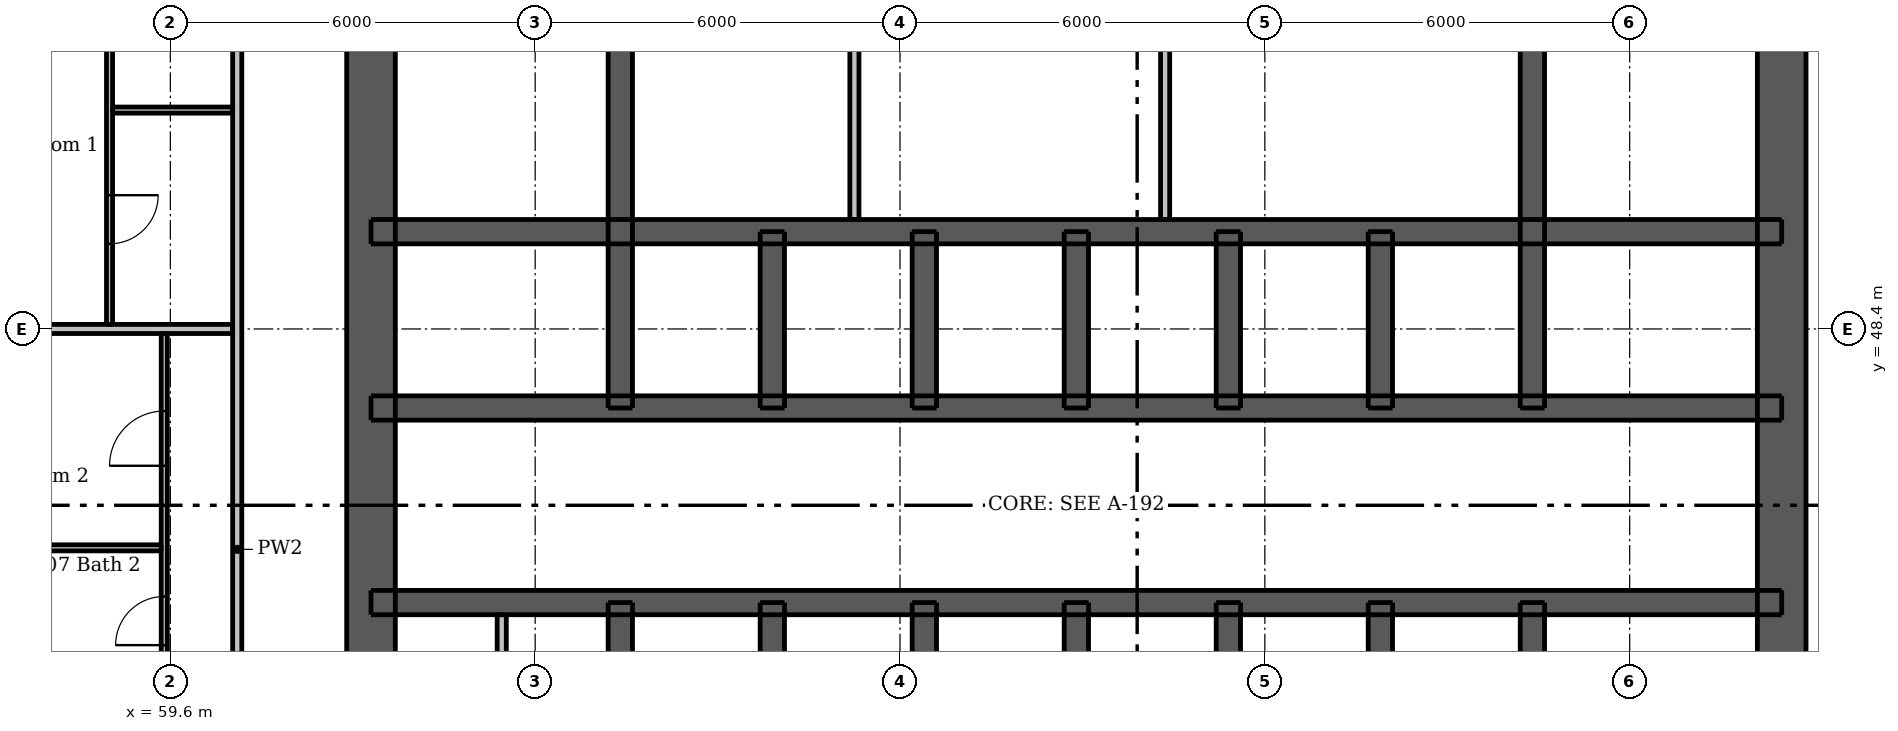
"""IFC4 building model, lengths in metres.
Left out: names, types, materials, properties, quantities, classifications, styles, units other than length and angle.
Written with IfcOpenShell. Run it as: python <this file> out.ifc"""

import sys

from ifc_helpers import new_model, si_unit, direction, frame, frame_2d, origin, place, context, subcontext, project, spatial, rectangle, extrude, element, fill, save


model = new_model("IFC4")
c1 = context("Model", 3, precision=1e-05, world=origin(), true_north=direction((0.0, 1.0)))
c2 = subcontext(c1, "Body", "Model", "MODEL_VIEW")
j1 = project(units=[si_unit("LENGTHUNIT", "METRE"), si_unit("PLANEANGLEUNIT", "RADIAN")], contexts=[c1])
p1 = place(None, origin())
s1 = spatial("IfcSite", under=j1, at=p1, CompositionType="ELEMENT")
p2 = place(p1, origin())
s2 = spatial("IfcBuilding", under=s1, at=p2, CompositionType="ELEMENT")
p3 = place(p2, frame((0.0, 0.0, 85.3)))
s3 = spatial("IfcBuildingStorey", under=s2, at=p3, CompositionType="ELEMENT", Elevation=85.3)
p4 = place(p3, frame((62.9, 33.5, 0.0), z_axis=(0.0, 0.0, 1.0), x_axis=(0.0, 1.0, 0.0)))
e1 = element("IfcWall", 1, at=p4, inside=s3, PredefinedType="SHEAR", context=c2, shape_type="SweptSolid", body=[
    extrude(rectangle(XDim=24.0, YDim=0.8, at=frame_2d((12.0, 0.0))), origin(), (0.0, 0.0, 1.0), 3.05),
])
p5 = place(p4, frame((11.2, 0.0, 0.0)))
e2 = element("IfcOpeningElement", 2, at=p5, cuts=e1, PredefinedType="OPENING", context=c2, shape_type="SweptSolid", body=[
    extrude(rectangle(XDim=1.6, YDim=2.1, at=frame_2d((0.8, 1.05))), frame((0.0, 0.41, 0.0), z_axis=(0.0, -1.0, 0.0), x_axis=(1.0, 0.0, 0.0)), (0.0, 0.0, 1.0), 0.82),
])
p6 = place(p3, frame((86.1, 33.5, 0.0), z_axis=(0.0, 0.0, 1.0), x_axis=(0.0, 1.0, 0.0)))
e3 = element("IfcWall", 3, at=p6, inside=s3, PredefinedType="SHEAR", context=c2, shape_type="SweptSolid", body=[
    extrude(rectangle(XDim=24.0, YDim=0.8, at=frame_2d((12.0, 0.0))), origin(), (0.0, 0.0, 1.0), 3.05),
])
p7 = place(p6, frame((11.2, 0.0, 0.0)))
e4 = element("IfcOpeningElement", 4, at=p7, cuts=e3, PredefinedType="OPENING", context=c2, shape_type="SweptSolid", body=[
    extrude(rectangle(XDim=1.6, YDim=2.1, at=frame_2d((0.8, 1.05))), frame((0.0, 0.41, 0.0), z_axis=(0.0, -1.0, 0.0), x_axis=(1.0, 0.0, 0.0)), (0.0, 0.0, 1.0), 0.82),
])
p8 = place(p3, frame((62.9, 43.9, 0.0), z_axis=(0.0, 0.0, 1.0), x_axis=(1.0, 0.0, 0.0)))
e5 = element("IfcWall", 5, at=p8, inside=s3, PredefinedType="SHEAR", context=c2, shape_type="SweptSolid", body=[
    extrude(rectangle(XDim=23.2, YDim=0.4, at=frame_2d((11.6, 0.0))), origin(), (0.0, 0.0, 1.0), 3.05),
])
p9 = place(p8, frame((0.825, 0.0, 0.0)))
e6 = element("IfcOpeningElement", 6, at=p9, cuts=e5, PredefinedType="OPENING", context=c2, shape_type="SweptSolid", body=[
    extrude(rectangle(XDim=0.9, YDim=2.1, at=frame_2d((0.45, 1.05))), frame((0.0, 0.21, 0.0), z_axis=(0.0, -1.0, 0.0), x_axis=(1.0, 0.0, 0.0)), (0.0, 0.0, 1.0), 0.42),
])
p10 = place(p8, frame((2.575, 0.0, 0.0)))
e7 = element("IfcOpeningElement", 7, at=p10, cuts=e5, PredefinedType="OPENING", context=c2, shape_type="SweptSolid", body=[
    extrude(rectangle(XDim=0.9, YDim=2.1, at=frame_2d((0.45, 1.05))), frame((0.0, 0.21, 0.0), z_axis=(0.0, -1.0, 0.0), x_axis=(1.0, 0.0, 0.0)), (0.0, 0.0, 1.0), 0.42),
])
p11 = place(p8, frame((20.6, 0.0, 0.0)))
e8 = element("IfcOpeningElement", 8, at=p11, cuts=e5, PredefinedType="OPENING", context=c2, shape_type="SweptSolid", body=[
    extrude(rectangle(XDim=0.9, YDim=2.1, at=frame_2d((0.45, 1.05))), frame((0.0, 0.21, 0.0), z_axis=(0.0, -1.0, 0.0), x_axis=(1.0, 0.0, 0.0)), (0.0, 0.0, 1.0), 0.42),
])
p12 = place(p8, frame((4.8, 0.0, 0.0)))
e9 = element("IfcOpeningElement", 9, at=p12, cuts=e5, PredefinedType="OPENING", context=c2, shape_type="SweptSolid", body=[
    extrude(rectangle(XDim=1.1, YDim=2.1, at=frame_2d((0.55, 1.05))), frame((0.0, 0.21, 0.0), z_axis=(0.0, -1.0, 0.0), x_axis=(1.0, 0.0, 0.0)), (0.0, 0.0, 1.0), 0.42),
])
p13 = place(p8, frame((7.3, 0.0, 0.0)))
e10 = element("IfcOpeningElement", 10, at=p13, cuts=e5, PredefinedType="OPENING", context=c2, shape_type="SweptSolid", body=[
    extrude(rectangle(XDim=1.1, YDim=2.1, at=frame_2d((0.55, 1.05))), frame((0.0, 0.21, 0.0), z_axis=(0.0, -1.0, 0.0), x_axis=(1.0, 0.0, 0.0)), (0.0, 0.0, 1.0), 0.42),
])
p14 = place(p8, frame((9.8, 0.0, 0.0)))
e11 = element("IfcOpeningElement", 11, at=p14, cuts=e5, PredefinedType="OPENING", context=c2, shape_type="SweptSolid", body=[
    extrude(rectangle(XDim=1.1, YDim=2.1, at=frame_2d((0.55, 1.05))), frame((0.0, 0.21, 0.0), z_axis=(0.0, -1.0, 0.0), x_axis=(1.0, 0.0, 0.0)), (0.0, 0.0, 1.0), 0.42),
])
p15 = place(p8, frame((12.3, 0.0, 0.0)))
e12 = element("IfcOpeningElement", 12, at=p15, cuts=e5, PredefinedType="OPENING", context=c2, shape_type="SweptSolid", body=[
    extrude(rectangle(XDim=1.1, YDim=2.1, at=frame_2d((0.55, 1.05))), frame((0.0, 0.21, 0.0), z_axis=(0.0, -1.0, 0.0), x_axis=(1.0, 0.0, 0.0)), (0.0, 0.0, 1.0), 0.42),
])
p16 = place(p8, frame((14.8, 0.0, 0.0)))
e13 = element("IfcOpeningElement", 13, at=p16, cuts=e5, PredefinedType="OPENING", context=c2, shape_type="SweptSolid", body=[
    extrude(rectangle(XDim=1.1, YDim=2.1, at=frame_2d((0.55, 1.05))), frame((0.0, 0.21, 0.0), z_axis=(0.0, -1.0, 0.0), x_axis=(1.0, 0.0, 0.0)), (0.0, 0.0, 1.0), 0.42),
])
p17 = place(p8, frame((17.3, 0.0, 0.0)))
e14 = element("IfcOpeningElement", 14, at=p17, cuts=e5, PredefinedType="OPENING", context=c2, shape_type="SweptSolid", body=[
    extrude(rectangle(XDim=1.1, YDim=2.1, at=frame_2d((0.55, 1.05))), frame((0.0, 0.21, 0.0), z_axis=(0.0, -1.0, 0.0), x_axis=(1.0, 0.0, 0.0)), (0.0, 0.0, 1.0), 0.42),
])
p18 = place(p3, frame((62.9, 47.1, 0.0), z_axis=(0.0, 0.0, 1.0), x_axis=(1.0, 0.0, 0.0)))
e15 = element("IfcWall", 15, at=p18, inside=s3, PredefinedType="SHEAR", context=c2, shape_type="SweptSolid", body=[
    extrude(rectangle(XDim=23.2, YDim=0.4, at=frame_2d((11.6, 0.0))), origin(), (0.0, 0.0, 1.0), 3.05),
])
p19 = place(p18, frame((1.7, 0.0, 0.0)))
e16 = element("IfcOpeningElement", 16, at=p19, cuts=e15, PredefinedType="OPENING", context=c2, shape_type="SweptSolid", body=[
    extrude(rectangle(XDim=0.9, YDim=2.1, at=frame_2d((0.45, 1.05))), frame((0.0, 0.21, 0.0), z_axis=(0.0, -1.0, 0.0), x_axis=(1.0, 0.0, 0.0)), (0.0, 0.0, 1.0), 0.42),
])
p20 = place(p18, frame((20.6, 0.0, 0.0)))
e17 = element("IfcOpeningElement", 17, at=p20, cuts=e15, PredefinedType="OPENING", context=c2, shape_type="SweptSolid", body=[
    extrude(rectangle(XDim=0.9, YDim=2.1, at=frame_2d((0.45, 1.05))), frame((0.0, 0.21, 0.0), z_axis=(0.0, -1.0, 0.0), x_axis=(1.0, 0.0, 0.0)), (0.0, 0.0, 1.0), 0.42),
])
p21 = place(p3, frame((62.9, 50.0, 0.0), z_axis=(0.0, 0.0, 1.0), x_axis=(1.0, 0.0, 0.0)))
e18 = element("IfcWall", 18, at=p21, inside=s3, PredefinedType="SHEAR", context=c2, shape_type="SweptSolid", body=[
    extrude(rectangle(XDim=23.2, YDim=0.4, at=frame_2d((11.6, 0.0))), origin(), (0.0, 0.0, 1.0), 3.05),
])
p22 = place(p3, frame((67.0, 33.9, 0.0), z_axis=(0.0, 0.0, 1.0), x_axis=(0.0, 1.0, 0.0)))
e19 = element("IfcWall", 19, at=p22, inside=s3, PredefinedType="SHEAR", context=c2, shape_type="SweptSolid", body=[
    extrude(rectangle(XDim=10.0, YDim=0.4, at=frame_2d((5.0, 0.0))), origin(), (0.0, 0.0, 1.0), 3.05),
])
p23 = place(p22, frame((0.6, 0.0, 0.0)))
e20 = element("IfcOpeningElement", 20, at=p23, cuts=e19, PredefinedType="OPENING", context=c2, shape_type="SweptSolid", body=[
    extrude(rectangle(XDim=1.1, YDim=2.1, at=frame_2d((0.55, 1.05))), frame((0.0, 0.21, 0.0), z_axis=(0.0, -1.0, 0.0), x_axis=(1.0, 0.0, 0.0)), (0.0, 0.0, 1.0), 0.42),
])
for number, where, z_axis, x_axis in (
    (21, (67.0, 47.1, 0.0), (0.0, 0.0, 1.0), (0.0, 1.0, 0.0)),
    (22, (82.0, 33.9, 0.0), (0.0, 0.0, 1.0), (0.0, 1.0, 0.0)),
    (23, (82.0, 47.1, 0.0), (0.0, 0.0, 1.0), (0.0, 1.0, 0.0)),
):
    element("IfcWall", number, at=place(p3, frame(where, z_axis=z_axis, x_axis=x_axis)), inside=s3, PredefinedType="SHEAR", context=c2, shape_type="SweptSolid", body=[
        extrude(rectangle(XDim=10.0, YDim=0.4, at=frame_2d((5.0, 0.0))), origin(), (0.0, 0.0, 1.0), 3.05),
    ])
for number, where, z_axis, x_axis in (
    (24, (69.5, 41.0, 0.0), (0.0, 0.0, 1.0), (0.0, 1.0, 0.0)),
    (25, (69.5, 47.1, 0.0), (0.0, 0.0, 1.0), (0.0, 1.0, 0.0)),
    (26, (72.0, 41.0, 0.0), (0.0, 0.0, 1.0), (0.0, 1.0, 0.0)),
    (27, (72.0, 47.1, 0.0), (0.0, 0.0, 1.0), (0.0, 1.0, 0.0)),
    (28, (74.5, 41.0, 0.0), (0.0, 0.0, 1.0), (0.0, 1.0, 0.0)),
    (29, (74.5, 47.1, 0.0), (0.0, 0.0, 1.0), (0.0, 1.0, 0.0)),
    (30, (77.0, 41.0, 0.0), (0.0, 0.0, 1.0), (0.0, 1.0, 0.0)),
    (31, (77.0, 47.1, 0.0), (0.0, 0.0, 1.0), (0.0, 1.0, 0.0)),
    (32, (79.5, 41.0, 0.0), (0.0, 0.0, 1.0), (0.0, 1.0, 0.0)),
    (33, (79.5, 47.1, 0.0), (0.0, 0.0, 1.0), (0.0, 1.0, 0.0)),
):
    element("IfcWall", number, at=place(p3, frame(where, z_axis=z_axis, x_axis=x_axis)), inside=s3, PredefinedType="SHEAR", context=c2, shape_type="SweptSolid", body=[
        extrude(rectangle(XDim=2.9, YDim=0.4, at=frame_2d((1.45, 0.0))), origin(), (0.0, 0.0, 1.0), 3.05),
    ])
p24 = place(p3, frame((65.05, 41.2, 0.0), z_axis=(0.0, 0.0, 1.0), x_axis=(0.0, 1.0, 0.0)))
e34 = element("IfcWall", 34, at=p24, inside=s3, PredefinedType="PLUMBINGWALL", context=c2, shape_type="SweptSolid", body=[
    extrude(rectangle(XDim=2.5, YDim=0.15, at=frame_2d((1.25, 0.0))), origin(), (0.0, 0.0, 1.0), 3.05),
])
for number, where, z_axis, x_axis in (
    (35, (70.85, 50.2, 0.0), (0.0, 0.0, 1.0), (0.0, 1.0, 0.0)),
    (36, (75.96, 50.2, 0.0), (0.0, 0.0, 1.0), (0.0, 1.0, 0.0)),
):
    element("IfcWall", number, at=place(p3, frame(where, z_axis=z_axis, x_axis=x_axis)), inside=s3, PredefinedType="PLUMBINGWALL", context=c2, shape_type="SweptSolid", body=[
        extrude(rectangle(XDim=6.5, YDim=0.15, at=frame_2d((3.25, 0.0))), origin(), (0.0, 0.0, 1.0), 3.05),
    ])
p25 = place(p3, frame((58.6, 54.35, 0.0), z_axis=(0.0, 0.0, 1.0), x_axis=(0.0, -1.0, 0.0)))
e37 = element("IfcWall", 37, at=p25, inside=s3, PredefinedType="PARTITIONING", context=c2, shape_type="SweptSolid", body=[
    extrude(rectangle(XDim=5.875, YDim=0.1, at=frame_2d((2.938, 0.0))), origin(), (0.0, 0.0, 1.0), 3.05),
])
p26 = place(p25, frame((3.75, 0.0, 0.0)))
e38 = element("IfcOpeningElement", 38, at=p26, cuts=e37, PredefinedType="OPENING", context=c2, shape_type="SweptSolid", body=[
    extrude(rectangle(XDim=0.8, YDim=2.1, at=frame_2d((0.4, 1.05))), frame((0.0, 0.06, 0.0), z_axis=(0.0, -1.0, 0.0), x_axis=(1.0, 0.0, 0.0)), (0.0, 0.0, 1.0), 0.12),
])
p27 = place(p3, frame((59.5, 31.65, 0.0), z_axis=(0.0, 0.0, 1.0), x_axis=(0.0, 1.0, 0.0)))
e39 = element("IfcWall", 39, at=p27, inside=s3, PredefinedType="PARTITIONING", context=c2, shape_type="SweptSolid", body=[
    extrude(rectangle(XDim=16.675, YDim=0.1, at=frame_2d((8.337, 0.0))), origin(), (0.0, 0.0, 1.0), 2.51),
])
p28 = place(p27, frame((0.75, 0.0, 0.0)))
e40 = element("IfcOpeningElement", 40, at=p28, cuts=e39, PredefinedType="OPENING", context=c2, shape_type="SweptSolid", body=[
    extrude(rectangle(XDim=0.9, YDim=2.1, at=frame_2d((0.45, 1.05))), frame((0.0, 0.06, 0.0), z_axis=(0.0, -1.0, 0.0), x_axis=(1.0, 0.0, 0.0)), (0.0, 0.0, 1.0), 0.12),
])
p29 = place(p27, frame((3.1, 0.0, 0.0)))
e41 = element("IfcOpeningElement", 41, at=p29, cuts=e39, PredefinedType="OPENING", context=c2, shape_type="SweptSolid", body=[
    extrude(rectangle(XDim=0.9, YDim=2.1, at=frame_2d((0.45, 1.05))), frame((0.0, 0.06, 0.0), z_axis=(0.0, -1.0, 0.0), x_axis=(1.0, 0.0, 0.0)), (0.0, 0.0, 1.0), 0.12),
])
p30 = place(p27, frame((8.5, 0.0, 0.0)))
e42 = element("IfcOpeningElement", 42, at=p30, cuts=e39, PredefinedType="OPENING", context=c2, shape_type="SweptSolid", body=[
    extrude(rectangle(XDim=0.9, YDim=2.1, at=frame_2d((0.45, 1.05))), frame((0.0, 0.06, 0.0), z_axis=(0.0, -1.0, 0.0), x_axis=(1.0, 0.0, 0.0)), (0.0, 0.0, 1.0), 0.12),
])
p31 = place(p27, frame((14.5, 0.0, 0.0)))
e43 = element("IfcOpeningElement", 43, at=p31, cuts=e39, PredefinedType="OPENING", context=c2, shape_type="SweptSolid", body=[
    extrude(rectangle(XDim=0.9, YDim=2.1, at=frame_2d((0.45, 1.05))), frame((0.0, 0.06, 0.0), z_axis=(0.0, -1.0, 0.0), x_axis=(1.0, 0.0, 0.0)), (0.0, 0.0, 1.0), 0.12),
])
p32 = place(p27, frame((5.55, 0.0, 0.0)))
e44 = element("IfcOpeningElement", 44, at=p32, cuts=e39, PredefinedType="OPENING", context=c2, shape_type="SweptSolid", body=[
    extrude(rectangle(XDim=0.8, YDim=2.1, at=frame_2d((0.4, 1.05))), frame((0.0, 0.06, 0.0), z_axis=(0.0, -1.0, 0.0), x_axis=(1.0, 0.0, 0.0)), (0.0, 0.0, 1.0), 0.12),
])
p33 = place(p27, frame((11.55, 0.0, 0.0)))
e45 = element("IfcOpeningElement", 45, at=p33, cuts=e39, PredefinedType="OPENING", context=c2, shape_type="SweptSolid", body=[
    extrude(rectangle(XDim=0.8, YDim=2.1, at=frame_2d((0.4, 1.05))), frame((0.0, 0.06, 0.0), z_axis=(0.0, -1.0, 0.0), x_axis=(1.0, 0.0, 0.0)), (0.0, 0.0, 1.0), 0.12),
])
p34 = place(p3, frame((58.65, 52.0, 0.0), z_axis=(0.0, 0.0, 1.0), x_axis=(1.0, 0.0, 0.0)))
e46 = element("IfcWall", 46, at=p34, inside=s3, PredefinedType="PARTITIONING", context=c2, shape_type="SweptSolid", body=[
    extrude(rectangle(XDim=1.975, YDim=0.1, at=frame_2d((0.988, 0.0))), origin(), (0.0, 0.0, 1.0), 3.05),
])
p35 = place(p3, frame((56.15, 44.8, 0.0), z_axis=(0.0, 0.0, 1.0), x_axis=(1.0, 0.0, 0.0)))
e47 = element("IfcWall", 47, at=p35, inside=s3, PredefinedType="PARTITIONING", context=c2, shape_type="SweptSolid", body=[
    extrude(rectangle(XDim=3.3, YDim=0.1, at=frame_2d((1.65, 0.0))), origin(), (0.0, 0.0, 1.0), 3.05),
])
p36 = place(p3, frame((60.7, 30.325, 0.0), z_axis=(0.0, 0.0, 1.0), x_axis=(0.0, 1.0, 0.0)))
e48 = element("IfcWall", 48, at=p36, inside=s3, PredefinedType="PARTITIONING", context=c2, shape_type="SweptSolid", body=[
    extrude(rectangle(XDim=28.9, YDim=0.15, at=frame_2d((14.45, 0.0))), origin(), (0.0, 0.0, 1.0), 3.05),
])
p37 = place(p36, frame((9.225, 0.0, 0.0)))
e49 = element("IfcOpeningElement", 49, at=p37, cuts=e48, PredefinedType="OPENING", context=c2, shape_type="SweptSolid", body=[
    extrude(rectangle(XDim=1.0, YDim=2.1, at=frame_2d((0.5, 1.05))), frame((0.0, 0.085, 0.0), z_axis=(0.0, -1.0, 0.0), x_axis=(1.0, 0.0, 0.0)), (0.0, 0.0, 1.0), 0.17),
])
p38 = place(p36, frame((26.025, 0.0, 0.0)))
e50 = element("IfcOpeningElement", 50, at=p38, cuts=e48, PredefinedType="OPENING", context=c2, shape_type="SweptSolid", body=[
    extrude(rectangle(XDim=1.0, YDim=2.1, at=frame_2d((0.5, 1.05))), frame((0.0, 0.085, 0.0), z_axis=(0.0, -1.0, 0.0), x_axis=(1.0, 0.0, 0.0)), (0.0, 0.0, 1.0), 0.17),
])
p39 = place(p3, frame((52.0, 48.4, 0.0), z_axis=(0.0, 0.0, 1.0), x_axis=(1.0, 0.0, 0.0)))
e51 = element("IfcWall", 51, at=p39, inside=s3, PredefinedType="PARTITIONING", context=c2, shape_type="SweptSolid", body=[
    extrude(rectangle(XDim=8.625, YDim=0.15, at=frame_2d((4.312, 0.0))), origin(), (0.0, 0.0, 1.0), 2.516),
])
p40 = place(p5, origin())
e52 = element("IfcDoor", 52, at=p40, inside=s3, OperationType="DOUBLE_DOOR_SINGLE_SWING", PredefinedType="DOOR", context=c2, shape_type="SweptSolid", body=[
    extrude(rectangle(XDim=1.6, YDim=2.1, at=frame_2d((0.8, 1.05))), frame((0.0, -0.337, 0.0), z_axis=(0.0, -1.0, 0.0), x_axis=(1.0, 0.0, 0.0)), (0.0, 0.0, 1.0), 0.05),
])
fill(e2, e52)
p41 = place(p7, origin())
e53 = element("IfcDoor", 53, at=p41, inside=s3, OperationType="DOUBLE_DOOR_SINGLE_SWING", PredefinedType="DOOR", context=c2, shape_type="SweptSolid", body=[
    extrude(rectangle(XDim=1.6, YDim=2.1, at=frame_2d((0.8, 1.05))), frame((0.0, 0.388, 0.0), z_axis=(0.0, -1.0, 0.0), x_axis=(1.0, 0.0, 0.0)), (0.0, 0.0, 1.0), 0.05),
])
fill(e4, e53)
p42 = place(p9, origin())
e54 = element("IfcDoor", 54, at=p42, inside=s3, OperationType="SINGLE_SWING_LEFT", PredefinedType="DOOR", context=c2, shape_type="SweptSolid", body=[
    extrude(rectangle(XDim=0.9, YDim=2.1, at=frame_2d((0.45, 1.05))), frame((0.0, -0.138, 0.0), z_axis=(0.0, -1.0, 0.0), x_axis=(1.0, 0.0, 0.0)), (0.0, 0.0, 1.0), 0.05),
])
fill(e6, e54)
p43 = place(p10, origin())
e55 = element("IfcDoor", 55, at=p43, inside=s3, OperationType="SINGLE_SWING_RIGHT", PredefinedType="DOOR", context=c2, shape_type="SweptSolid", body=[
    extrude(rectangle(XDim=0.9, YDim=2.1, at=frame_2d((0.45, 1.05))), frame((0.0, -0.138, 0.0), z_axis=(0.0, -1.0, 0.0), x_axis=(1.0, 0.0, 0.0)), (0.0, 0.0, 1.0), 0.05),
])
fill(e7, e55)
p44 = place(p11, origin())
e56 = element("IfcDoor", 56, at=p44, inside=s3, OperationType="SINGLE_SWING_LEFT", PredefinedType="DOOR", context=c2, shape_type="SweptSolid", body=[
    extrude(rectangle(XDim=0.9, YDim=2.1, at=frame_2d((0.45, 1.05))), frame((0.0, -0.138, 0.0), z_axis=(0.0, -1.0, 0.0), x_axis=(1.0, 0.0, 0.0)), (0.0, 0.0, 1.0), 0.05),
])
fill(e8, e56)
p45 = place(p19, origin())
e57 = element("IfcDoor", 57, at=p45, inside=s3, OperationType="SINGLE_SWING_LEFT", PredefinedType="DOOR", context=c2, shape_type="SweptSolid", body=[
    extrude(rectangle(XDim=0.9, YDim=2.1, at=frame_2d((0.45, 1.05))), frame((0.0, 0.188, 0.0), z_axis=(0.0, -1.0, 0.0), x_axis=(1.0, 0.0, 0.0)), (0.0, 0.0, 1.0), 0.05),
])
fill(e16, e57)
p46 = place(p20, origin())
e58 = element("IfcDoor", 58, at=p46, inside=s3, OperationType="SINGLE_SWING_LEFT", PredefinedType="DOOR", context=c2, shape_type="SweptSolid", body=[
    extrude(rectangle(XDim=0.9, YDim=2.1, at=frame_2d((0.45, 1.05))), frame((0.0, 0.188, 0.0), z_axis=(0.0, -1.0, 0.0), x_axis=(1.0, 0.0, 0.0)), (0.0, 0.0, 1.0), 0.05),
])
fill(e17, e58)
p47 = place(p12, origin())
e59 = element("IfcDoor", 59, at=p47, inside=s3, OperationType="DOUBLE_DOOR_SLIDING", PredefinedType="DOOR", context=c2, shape_type="SweptSolid", body=[
    extrude(rectangle(XDim=1.1, YDim=2.1, at=frame_2d((0.55, 1.05))), frame((0.0, 0.025, 0.0), z_axis=(0.0, -1.0, 0.0), x_axis=(1.0, 0.0, 0.0)), (0.0, 0.0, 1.0), 0.05),
])
fill(e9, e59)
p48 = place(p13, origin())
e60 = element("IfcDoor", 60, at=p48, inside=s3, OperationType="DOUBLE_DOOR_SLIDING", PredefinedType="DOOR", context=c2, shape_type="SweptSolid", body=[
    extrude(rectangle(XDim=1.1, YDim=2.1, at=frame_2d((0.55, 1.05))), frame((0.0, 0.025, 0.0), z_axis=(0.0, -1.0, 0.0), x_axis=(1.0, 0.0, 0.0)), (0.0, 0.0, 1.0), 0.05),
])
fill(e10, e60)
p49 = place(p14, origin())
e61 = element("IfcDoor", 61, at=p49, inside=s3, OperationType="DOUBLE_DOOR_SLIDING", PredefinedType="DOOR", context=c2, shape_type="SweptSolid", body=[
    extrude(rectangle(XDim=1.1, YDim=2.1, at=frame_2d((0.55, 1.05))), frame((0.0, 0.025, 0.0), z_axis=(0.0, -1.0, 0.0), x_axis=(1.0, 0.0, 0.0)), (0.0, 0.0, 1.0), 0.05),
])
fill(e11, e61)
p50 = place(p15, origin())
e62 = element("IfcDoor", 62, at=p50, inside=s3, OperationType="DOUBLE_DOOR_SLIDING", PredefinedType="DOOR", context=c2, shape_type="SweptSolid", body=[
    extrude(rectangle(XDim=1.1, YDim=2.1, at=frame_2d((0.55, 1.05))), frame((0.0, 0.025, 0.0), z_axis=(0.0, -1.0, 0.0), x_axis=(1.0, 0.0, 0.0)), (0.0, 0.0, 1.0), 0.05),
])
fill(e12, e62)
p51 = place(p16, origin())
e63 = element("IfcDoor", 63, at=p51, inside=s3, OperationType="DOUBLE_DOOR_SLIDING", PredefinedType="DOOR", context=c2, shape_type="SweptSolid", body=[
    extrude(rectangle(XDim=1.1, YDim=2.1, at=frame_2d((0.55, 1.05))), frame((0.0, 0.025, 0.0), z_axis=(0.0, -1.0, 0.0), x_axis=(1.0, 0.0, 0.0)), (0.0, 0.0, 1.0), 0.05),
])
fill(e13, e63)
p52 = place(p17, origin())
e64 = element("IfcDoor", 64, at=p52, inside=s3, OperationType="DOUBLE_DOOR_SLIDING", PredefinedType="DOOR", context=c2, shape_type="SweptSolid", body=[
    extrude(rectangle(XDim=1.1, YDim=2.1, at=frame_2d((0.55, 1.05))), frame((0.0, 0.025, 0.0), z_axis=(0.0, -1.0, 0.0), x_axis=(1.0, 0.0, 0.0)), (0.0, 0.0, 1.0), 0.05),
])
fill(e14, e64)
p53 = place(p31, origin())
e65 = element("IfcDoor", 65, at=p53, inside=s3, OperationType="SINGLE_SWING_LEFT", PredefinedType="DOOR", context=c2, shape_type="SweptSolid", body=[
    extrude(rectangle(XDim=0.9, YDim=2.1, at=frame_2d((0.45, 1.05))), frame((0.0, 0.025, 0.0), z_axis=(0.0, -1.0, 0.0), x_axis=(1.0, 0.0, 0.0)), (0.0, 0.0, 1.0), 0.05),
])
fill(e43, e65)
p54 = place(p33, origin())
e66 = element("IfcDoor", 66, at=p54, inside=s3, OperationType="SINGLE_SWING_LEFT", PredefinedType="DOOR", context=c2, shape_type="SweptSolid", body=[
    extrude(rectangle(XDim=0.8, YDim=2.1, at=frame_2d((0.4, 1.05))), frame((0.0, 0.025, 0.0), z_axis=(0.0, -1.0, 0.0), x_axis=(1.0, 0.0, 0.0)), (0.0, 0.0, 1.0), 0.05),
])
fill(e45, e66)
p55 = place(p26, origin())
e67 = element("IfcDoor", 67, at=p55, inside=s3, OperationType="SINGLE_SWING_LEFT", PredefinedType="DOOR", context=c2, shape_type="SweptSolid", body=[
    extrude(rectangle(XDim=0.8, YDim=2.1, at=frame_2d((0.4, 1.05))), frame((0.0, 0.025, 0.0), z_axis=(0.0, -1.0, 0.0), x_axis=(1.0, 0.0, 0.0)), (0.0, 0.0, 1.0), 0.05),
])
fill(e38, e67)
save(model, sys.argv[1])
